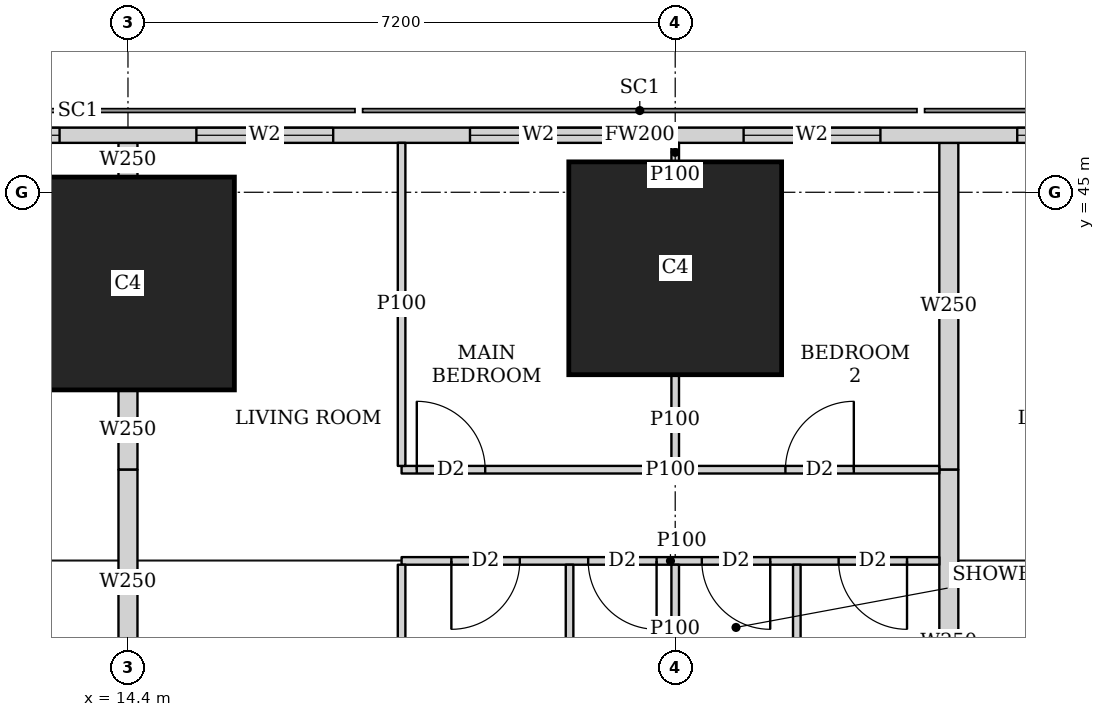
"""IFC4 building model, lengths in metres.
Left out: names, types, materials, properties, quantities, classifications, styles, units other than length and angle.
Written with IfcOpenShell. Run it as: python <this file> out.ifc"""

import sys

from ifc_helpers import new_model, si_unit, direction, frame, frame_2d, origin, origin_2d, place, context, subcontext, project, spatial, rectangle, extrude, element, fill, save


model = new_model("IFC4")
c1 = context("Model", 3, precision=1e-05, world=origin(), true_north=direction((0.0, 1.0)))
c2 = subcontext(c1, "Body", "Model", "MODEL_VIEW")
j1 = project(units=[si_unit("LENGTHUNIT", "METRE"), si_unit("PLANEANGLEUNIT", "RADIAN")], contexts=[c1])
p1 = place(None, origin())
s1 = spatial("IfcSite", under=j1, at=p1, CompositionType="ELEMENT")
p2 = place(p1, origin())
s2 = spatial("IfcBuilding", under=s1, at=p2, CompositionType="ELEMENT")
p3 = place(p2, frame((0.0, 0.0, 31.25)))
s3 = spatial("IfcBuildingStorey", under=s2, at=p3, CompositionType="ELEMENT", Elevation=31.25)
for number, where, z_axis, x_axis in (
    (1, (14.4, 43.8, 0.0), (0.0, 0.0, 1.0), (1.0, 0.0, 0.0)),
    (2, (21.6, 44.0, 0.0), (0.0, 0.0, 1.0), (1.0, 0.0, 0.0)),
):
    element("IfcColumn", number, at=place(p3, frame(where, z_axis=z_axis, x_axis=x_axis)), inside=s3, PredefinedType="COLUMN", context=c2, shape_type="SweptSolid", body=[
        extrude(rectangle(XDim=2.8, YDim=2.8, at=origin_2d()), origin(), (0.0, 0.0, 1.0), 3.75),
    ])
p4 = place(p3, frame((40.106, 45.75, 0.0), z_axis=(0.0, 0.0, 1.0), x_axis=(-1.0, 0.0, 0.0)))
e3 = element("IfcWall", 3, at=p4, inside=s3, PredefinedType="SOLIDWALL", context=c2, shape_type="SweptSolid", body=[
    extrude(rectangle(XDim=37.943, YDim=0.2, at=frame_2d((18.971, 0.0))), origin(), (0.0, 0.0, 1.0), 3.5),
])
p5 = place(p4, frame((8.606, 0.0, 0.9)))
e4 = element("IfcOpeningElement", 4, at=p5, cuts=e3, PredefinedType="OPENING", context=c2, shape_type="SweptSolid", body=[
    extrude(rectangle(XDim=1.8, YDim=1.5, at=frame_2d((0.9, 0.75))), frame((0.0, 0.11, 0.0), z_axis=(0.0, -1.0, 0.0), x_axis=(1.0, 0.0, 0.0)), (0.0, 0.0, 1.0), 0.22),
])
p6 = place(p4, frame((12.206, 0.0, 0.9)))
e5 = element("IfcOpeningElement", 5, at=p6, cuts=e3, PredefinedType="OPENING", context=c2, shape_type="SweptSolid", body=[
    extrude(rectangle(XDim=1.8, YDim=1.5, at=frame_2d((0.9, 0.75))), frame((0.0, 0.11, 0.0), z_axis=(0.0, -1.0, 0.0), x_axis=(1.0, 0.0, 0.0)), (0.0, 0.0, 1.0), 0.22),
])
p7 = place(p4, frame((15.806, 0.0, 0.9)))
e6 = element("IfcOpeningElement", 6, at=p7, cuts=e3, PredefinedType="OPENING", context=c2, shape_type="SweptSolid", body=[
    extrude(rectangle(XDim=1.8, YDim=1.5, at=frame_2d((0.9, 0.75))), frame((0.0, 0.11, 0.0), z_axis=(0.0, -1.0, 0.0), x_axis=(1.0, 0.0, 0.0)), (0.0, 0.0, 1.0), 0.22),
])
p8 = place(p4, frame((19.406, 0.0, 0.9)))
e7 = element("IfcOpeningElement", 7, at=p8, cuts=e3, PredefinedType="OPENING", context=c2, shape_type="SweptSolid", body=[
    extrude(rectangle(XDim=1.8, YDim=1.5, at=frame_2d((0.9, 0.75))), frame((0.0, 0.11, 0.0), z_axis=(0.0, -1.0, 0.0), x_axis=(1.0, 0.0, 0.0)), (0.0, 0.0, 1.0), 0.22),
])
p9 = place(p4, frame((23.006, 0.0, 0.9)))
e8 = element("IfcOpeningElement", 8, at=p9, cuts=e3, PredefinedType="OPENING", context=c2, shape_type="SweptSolid", body=[
    extrude(rectangle(XDim=1.8, YDim=1.5, at=frame_2d((0.9, 0.75))), frame((0.0, 0.11, 0.0), z_axis=(0.0, -1.0, 0.0), x_axis=(1.0, 0.0, 0.0)), (0.0, 0.0, 1.0), 0.22),
])
p10 = place(p4, frame((26.606, 0.0, 0.9)))
e9 = element("IfcOpeningElement", 9, at=p10, cuts=e3, PredefinedType="OPENING", context=c2, shape_type="SweptSolid", body=[
    extrude(rectangle(XDim=1.8, YDim=1.5, at=frame_2d((0.9, 0.75))), frame((0.0, 0.11, 0.0), z_axis=(0.0, -1.0, 0.0), x_axis=(1.0, 0.0, 0.0)), (0.0, 0.0, 1.0), 0.22),
])
p11 = place(p3, frame((18.0, 41.35, 0.0), z_axis=(0.0, 0.0, 1.0), x_axis=(1.0, 0.0, 0.0)))
e10 = element("IfcWall", 10, at=p11, inside=s3, PredefinedType="PARTITIONING", context=c2, shape_type="SweptSolid", body=[
    extrude(rectangle(XDim=7.075, YDim=0.1, at=frame_2d((3.538, 0.0))), origin(), (0.0, 0.0, 1.0), 3.5),
])
p12 = place(p11, frame((0.2, 0.0, 0.0)))
e11 = element("IfcOpeningElement", 11, at=p12, cuts=e10, PredefinedType="OPENING", context=c2, shape_type="SweptSolid", body=[
    extrude(rectangle(XDim=0.9, YDim=2.1, at=frame_2d((0.45, 1.05))), frame((0.0, 0.06, 0.0), z_axis=(0.0, -1.0, 0.0), x_axis=(1.0, 0.0, 0.0)), (0.0, 0.0, 1.0), 0.12),
])
p13 = place(p11, frame((5.05, 0.0, 0.0)))
e12 = element("IfcOpeningElement", 12, at=p13, cuts=e10, PredefinedType="OPENING", context=c2, shape_type="SweptSolid", body=[
    extrude(rectangle(XDim=0.9, YDim=2.1, at=frame_2d((0.45, 1.05))), frame((0.0, 0.06, 0.0), z_axis=(0.0, -1.0, 0.0), x_axis=(1.0, 0.0, 0.0)), (0.0, 0.0, 1.0), 0.12),
])
p14 = place(p3, frame((18.0, 40.15, 0.0), z_axis=(0.0, 0.0, 1.0), x_axis=(1.0, 0.0, 0.0)))
e13 = element("IfcWall", 13, at=p14, inside=s3, PredefinedType="PARTITIONING", context=c2, shape_type="SweptSolid", body=[
    extrude(rectangle(XDim=7.075, YDim=0.1, at=frame_2d((3.538, 0.0))), origin(), (0.0, 0.0, 1.0), 3.5),
])
p15 = place(p14, frame((0.655, 0.0, 0.0)))
e14 = element("IfcOpeningElement", 14, at=p15, cuts=e13, PredefinedType="OPENING", context=c2, shape_type="SweptSolid", body=[
    extrude(rectangle(XDim=0.9, YDim=2.1, at=frame_2d((0.45, 1.05))), frame((0.0, 0.06, 0.0), z_axis=(0.0, -1.0, 0.0), x_axis=(1.0, 0.0, 0.0)), (0.0, 0.0, 1.0), 0.12),
])
p16 = place(p14, frame((3.95, 0.0, 0.0)))
e15 = element("IfcOpeningElement", 15, at=p16, cuts=e13, PredefinedType="OPENING", context=c2, shape_type="SweptSolid", body=[
    extrude(rectangle(XDim=0.9, YDim=2.1, at=frame_2d((0.45, 1.05))), frame((0.0, 0.06, 0.0), z_axis=(0.0, -1.0, 0.0), x_axis=(1.0, 0.0, 0.0)), (0.0, 0.0, 1.0), 0.12),
])
p17 = place(p14, frame((2.455, 0.0, 0.0)))
e16 = element("IfcOpeningElement", 16, at=p17, cuts=e13, PredefinedType="OPENING", context=c2, shape_type="SweptSolid", body=[
    extrude(rectangle(XDim=0.9, YDim=2.1, at=frame_2d((0.45, 1.05))), frame((0.0, 0.06, 0.0), z_axis=(0.0, -1.0, 0.0), x_axis=(1.0, 0.0, 0.0)), (0.0, 0.0, 1.0), 0.12),
])
p18 = place(p14, frame((5.75, 0.0, 0.0)))
e17 = element("IfcOpeningElement", 17, at=p18, cuts=e13, PredefinedType="OPENING", context=c2, shape_type="SweptSolid", body=[
    extrude(rectangle(XDim=0.9, YDim=2.1, at=frame_2d((0.45, 1.05))), frame((0.0, 0.06, 0.0), z_axis=(0.0, -1.0, 0.0), x_axis=(1.0, 0.0, 0.0)), (0.0, 0.0, 1.0), 0.12),
])
p19 = place(p3, frame((18.0, 41.4, 0.0), z_axis=(0.0, 0.0, 1.0), x_axis=(0.0, 1.0, 0.0)))
e18 = element("IfcWall", 18, at=p19, inside=s3, PredefinedType="PARTITIONING", context=c2, shape_type="SweptSolid", body=[
    extrude(rectangle(XDim=4.25, YDim=0.1, at=frame_2d((2.125, 0.0))), origin(), (0.0, 0.0, 1.0), 2.05),
])
p20 = place(p3, frame((21.6, 41.4, 0.0), z_axis=(0.0, 0.0, 1.0), x_axis=(0.0, 1.0, 0.0)))
e19 = element("IfcWall", 19, at=p20, inside=s3, PredefinedType="PARTITIONING", context=c2, shape_type="SweptSolid", body=[
    extrude(rectangle(XDim=1.199, YDim=0.1, at=frame_2d((0.6, 0.0))), origin(), (0.0, 0.0, 1.0), 3.5),
])
p21 = place(p3, frame((21.6, 45.401, 0.0), z_axis=(0.0, 0.0, 1.0), x_axis=(0.0, 1.0, 0.0)))
e20 = element("IfcWall", 20, at=p21, inside=s3, PredefinedType="PARTITIONING", context=c2, shape_type="SweptSolid", body=[
    extrude(rectangle(XDim=0.249, YDim=0.1, at=frame_2d((0.125, 0.0))), origin(), (0.0, 0.0, 1.0), 3.5),
])
p22 = place(p3, frame((18.0, 36.825, 0.0), z_axis=(0.0, 0.0, 1.0), x_axis=(0.0, 1.0, 0.0)))
e21 = element("IfcWall", 21, at=p22, inside=s3, PredefinedType="PARTITIONING", context=c2, shape_type="SweptSolid", body=[
    extrude(rectangle(XDim=3.275, YDim=0.1, at=frame_2d((1.638, 0.0))), origin(), (0.0, 0.0, 1.0), 3.5),
])
p23 = place(p3, frame((21.6, 38.401, 0.0), z_axis=(0.0, 0.0, 1.0), x_axis=(0.0, 1.0, 0.0)))
e22 = element("IfcWall", 22, at=p23, inside=s3, PredefinedType="PARTITIONING", context=c2, shape_type="SweptSolid", body=[
    extrude(rectangle(XDim=1.699, YDim=0.1, at=frame_2d((0.85, 0.0))), origin(), (0.0, 0.0, 1.0), 3.5),
])
for number, where, z_axis, x_axis in (
    (23, (20.21, 36.825, 0.0), (0.0, 0.0, 1.0), (0.0, 1.0, 0.0)),
    (24, (23.2, 36.825, 0.0), (0.0, 0.0, 1.0), (0.0, 1.0, 0.0)),
):
    element("IfcWall", number, at=place(p3, frame(where, z_axis=z_axis, x_axis=x_axis)), inside=s3, PredefinedType="PARTITIONING", context=c2, shape_type="SweptSolid", body=[
        extrude(rectangle(XDim=3.275, YDim=0.1, at=frame_2d((1.638, 0.0))), origin(), (0.0, 0.0, 1.0), 3.5),
    ])
p24 = place(p3, frame((14.4, 41.35, 0.0), z_axis=(0.0, 0.0, 1.0), x_axis=(0.0, 1.0, 0.0)))
e25 = element("IfcWall", 25, at=p24, inside=s3, PredefinedType="SOLIDWALL", context=c2, shape_type="SweptSolid", body=[
    extrude(rectangle(XDim=1.049, YDim=0.25, at=frame_2d((0.524, 0.0))), origin(), (0.0, 0.0, 1.0), 3.5),
])
p25 = place(p3, frame((14.4, 45.201, 0.0), z_axis=(0.0, 0.0, 1.0), x_axis=(0.0, 1.0, 0.0)))
e26 = element("IfcWall", 26, at=p25, inside=s3, PredefinedType="SOLIDWALL", context=c2, shape_type="SweptSolid", body=[
    extrude(rectangle(XDim=0.449, YDim=0.25, at=frame_2d((0.225, 0.0))), origin(), (0.0, 0.0, 1.0), 3.5),
])
p26 = place(p3, frame((14.4, 38.401, 0.0), z_axis=(0.0, 0.0, 1.0), x_axis=(0.0, 1.0, 0.0)))
e27 = element("IfcWall", 27, at=p26, inside=s3, PredefinedType="SOLIDWALL", context=c2, shape_type="SweptSolid", body=[
    extrude(rectangle(XDim=2.949, YDim=0.25, at=frame_2d((1.475, 0.0))), origin(), (0.0, 0.0, 1.0), 3.5),
])
p27 = place(p3, frame((25.2, 41.35, 0.0), z_axis=(0.0, 0.0, 1.0), x_axis=(0.0, 1.0, 0.0)))
e28 = element("IfcWall", 28, at=p27, inside=s3, PredefinedType="SOLIDWALL", context=c2, shape_type="SweptSolid", body=[
    extrude(rectangle(XDim=4.3, YDim=0.25, at=frame_2d((2.15, 0.0))), origin(), (0.0, 0.0, 1.0), 2.05),
])
p28 = place(p3, frame((25.2, 36.825, 0.0), z_axis=(0.0, 0.0, 1.0), x_axis=(0.0, 1.0, 0.0)))
e29 = element("IfcWall", 29, at=p28, inside=s3, PredefinedType="SOLIDWALL", context=c2, shape_type="SweptSolid", body=[
    extrude(rectangle(XDim=4.525, YDim=0.25, at=frame_2d((2.263, 0.0))), origin(), (0.0, 0.0, 1.0), 3.5),
])
p29 = place(p6, origin())
e30 = element("IfcWindow", 30, at=p29, inside=s3, PartitioningType="SINGLE_PANEL", PredefinedType="WINDOW", context=c2, shape_type="SweptSolid", body=[
    extrude(rectangle(XDim=1.8, YDim=1.5, at=frame_2d((0.9, 0.75))), frame((0.0, 0.03, 0.0), z_axis=(0.0, -1.0, 0.0), x_axis=(1.0, 0.0, 0.0)), (0.0, 0.0, 1.0), 0.06),
])
fill(e5, e30)
p30 = place(p7, origin())
e31 = element("IfcWindow", 31, at=p30, inside=s3, PartitioningType="SINGLE_PANEL", PredefinedType="WINDOW", context=c2, shape_type="SweptSolid", body=[
    extrude(rectangle(XDim=1.8, YDim=1.5, at=frame_2d((0.9, 0.75))), frame((0.0, 0.03, 0.0), z_axis=(0.0, -1.0, 0.0), x_axis=(1.0, 0.0, 0.0)), (0.0, 0.0, 1.0), 0.06),
])
fill(e6, e31)
p31 = place(p8, origin())
e32 = element("IfcWindow", 32, at=p31, inside=s3, PartitioningType="SINGLE_PANEL", PredefinedType="WINDOW", context=c2, shape_type="SweptSolid", body=[
    extrude(rectangle(XDim=1.8, YDim=1.5, at=frame_2d((0.9, 0.75))), frame((0.0, 0.03, 0.0), z_axis=(0.0, -1.0, 0.0), x_axis=(1.0, 0.0, 0.0)), (0.0, 0.0, 1.0), 0.06),
])
fill(e7, e32)
p32 = place(p9, origin())
e33 = element("IfcWindow", 33, at=p32, inside=s3, PartitioningType="SINGLE_PANEL", PredefinedType="WINDOW", context=c2, shape_type="SweptSolid", body=[
    extrude(rectangle(XDim=1.8, YDim=1.5, at=frame_2d((0.9, 0.75))), frame((0.0, 0.03, 0.0), z_axis=(0.0, -1.0, 0.0), x_axis=(1.0, 0.0, 0.0)), (0.0, 0.0, 1.0), 0.06),
])
fill(e8, e33)
p33 = place(p10, origin())
e34 = element("IfcWindow", 34, at=p33, inside=s3, PartitioningType="SINGLE_PANEL", PredefinedType="WINDOW", context=c2, shape_type="SweptSolid", body=[
    extrude(rectangle(XDim=1.8, YDim=1.5, at=frame_2d((0.9, 0.75))), frame((0.0, 0.03, 0.0), z_axis=(0.0, -1.0, 0.0), x_axis=(1.0, 0.0, 0.0)), (0.0, 0.0, 1.0), 0.06),
])
fill(e9, e34)
p34 = place(p12, origin())
e35 = element("IfcDoor", 35, at=p34, inside=s3, OperationType="SINGLE_SWING_LEFT", PredefinedType="DOOR", context=c2, shape_type="SweptSolid", body=[
    extrude(rectangle(XDim=0.9, YDim=2.1, at=frame_2d((0.45, 1.05))), frame((0.0, 0.025, 0.0), z_axis=(0.0, -1.0, 0.0), x_axis=(1.0, 0.0, 0.0)), (0.0, 0.0, 1.0), 0.05),
])
fill(e11, e35)
p35 = place(p13, origin())
e36 = element("IfcDoor", 36, at=p35, inside=s3, OperationType="SINGLE_SWING_RIGHT", PredefinedType="DOOR", context=c2, shape_type="SweptSolid", body=[
    extrude(rectangle(XDim=0.9, YDim=2.1, at=frame_2d((0.45, 1.05))), frame((0.0, 0.025, 0.0), z_axis=(0.0, -1.0, 0.0), x_axis=(1.0, 0.0, 0.0)), (0.0, 0.0, 1.0), 0.05),
])
fill(e12, e36)
p36 = place(p15, origin())
e37 = element("IfcDoor", 37, at=p36, inside=s3, OperationType="SINGLE_SWING_RIGHT", PredefinedType="DOOR", context=c2, shape_type="SweptSolid", body=[
    extrude(rectangle(XDim=0.9, YDim=2.1, at=frame_2d((0.45, 1.05))), frame((0.0, 0.025, 0.0), z_axis=(0.0, -1.0, 0.0), x_axis=(1.0, 0.0, 0.0)), (0.0, 0.0, 1.0), 0.05),
])
fill(e14, e37)
p37 = place(p16, origin())
e38 = element("IfcDoor", 38, at=p37, inside=s3, OperationType="SINGLE_SWING_LEFT", PredefinedType="DOOR", context=c2, shape_type="SweptSolid", body=[
    extrude(rectangle(XDim=0.9, YDim=2.1, at=frame_2d((0.45, 1.05))), frame((0.0, 0.025, 0.0), z_axis=(0.0, -1.0, 0.0), x_axis=(1.0, 0.0, 0.0)), (0.0, 0.0, 1.0), 0.05),
])
fill(e15, e38)
p38 = place(p17, origin())
e39 = element("IfcDoor", 39, at=p38, inside=s3, OperationType="SINGLE_SWING_LEFT", PredefinedType="DOOR", context=c2, shape_type="SweptSolid", body=[
    extrude(rectangle(XDim=0.9, YDim=2.1, at=frame_2d((0.45, 1.05))), frame((0.0, 0.025, 0.0), z_axis=(0.0, -1.0, 0.0), x_axis=(1.0, 0.0, 0.0)), (0.0, 0.0, 1.0), 0.05),
])
fill(e16, e39)
p39 = place(p18, origin())
e40 = element("IfcDoor", 40, at=p39, inside=s3, OperationType="SINGLE_SWING_LEFT", PredefinedType="DOOR", context=c2, shape_type="SweptSolid", body=[
    extrude(rectangle(XDim=0.9, YDim=2.1, at=frame_2d((0.45, 1.05))), frame((0.0, 0.025, 0.0), z_axis=(0.0, -1.0, 0.0), x_axis=(1.0, 0.0, 0.0)), (0.0, 0.0, 1.0), 0.05),
])
fill(e17, e40)
save(model, sys.argv[1])
